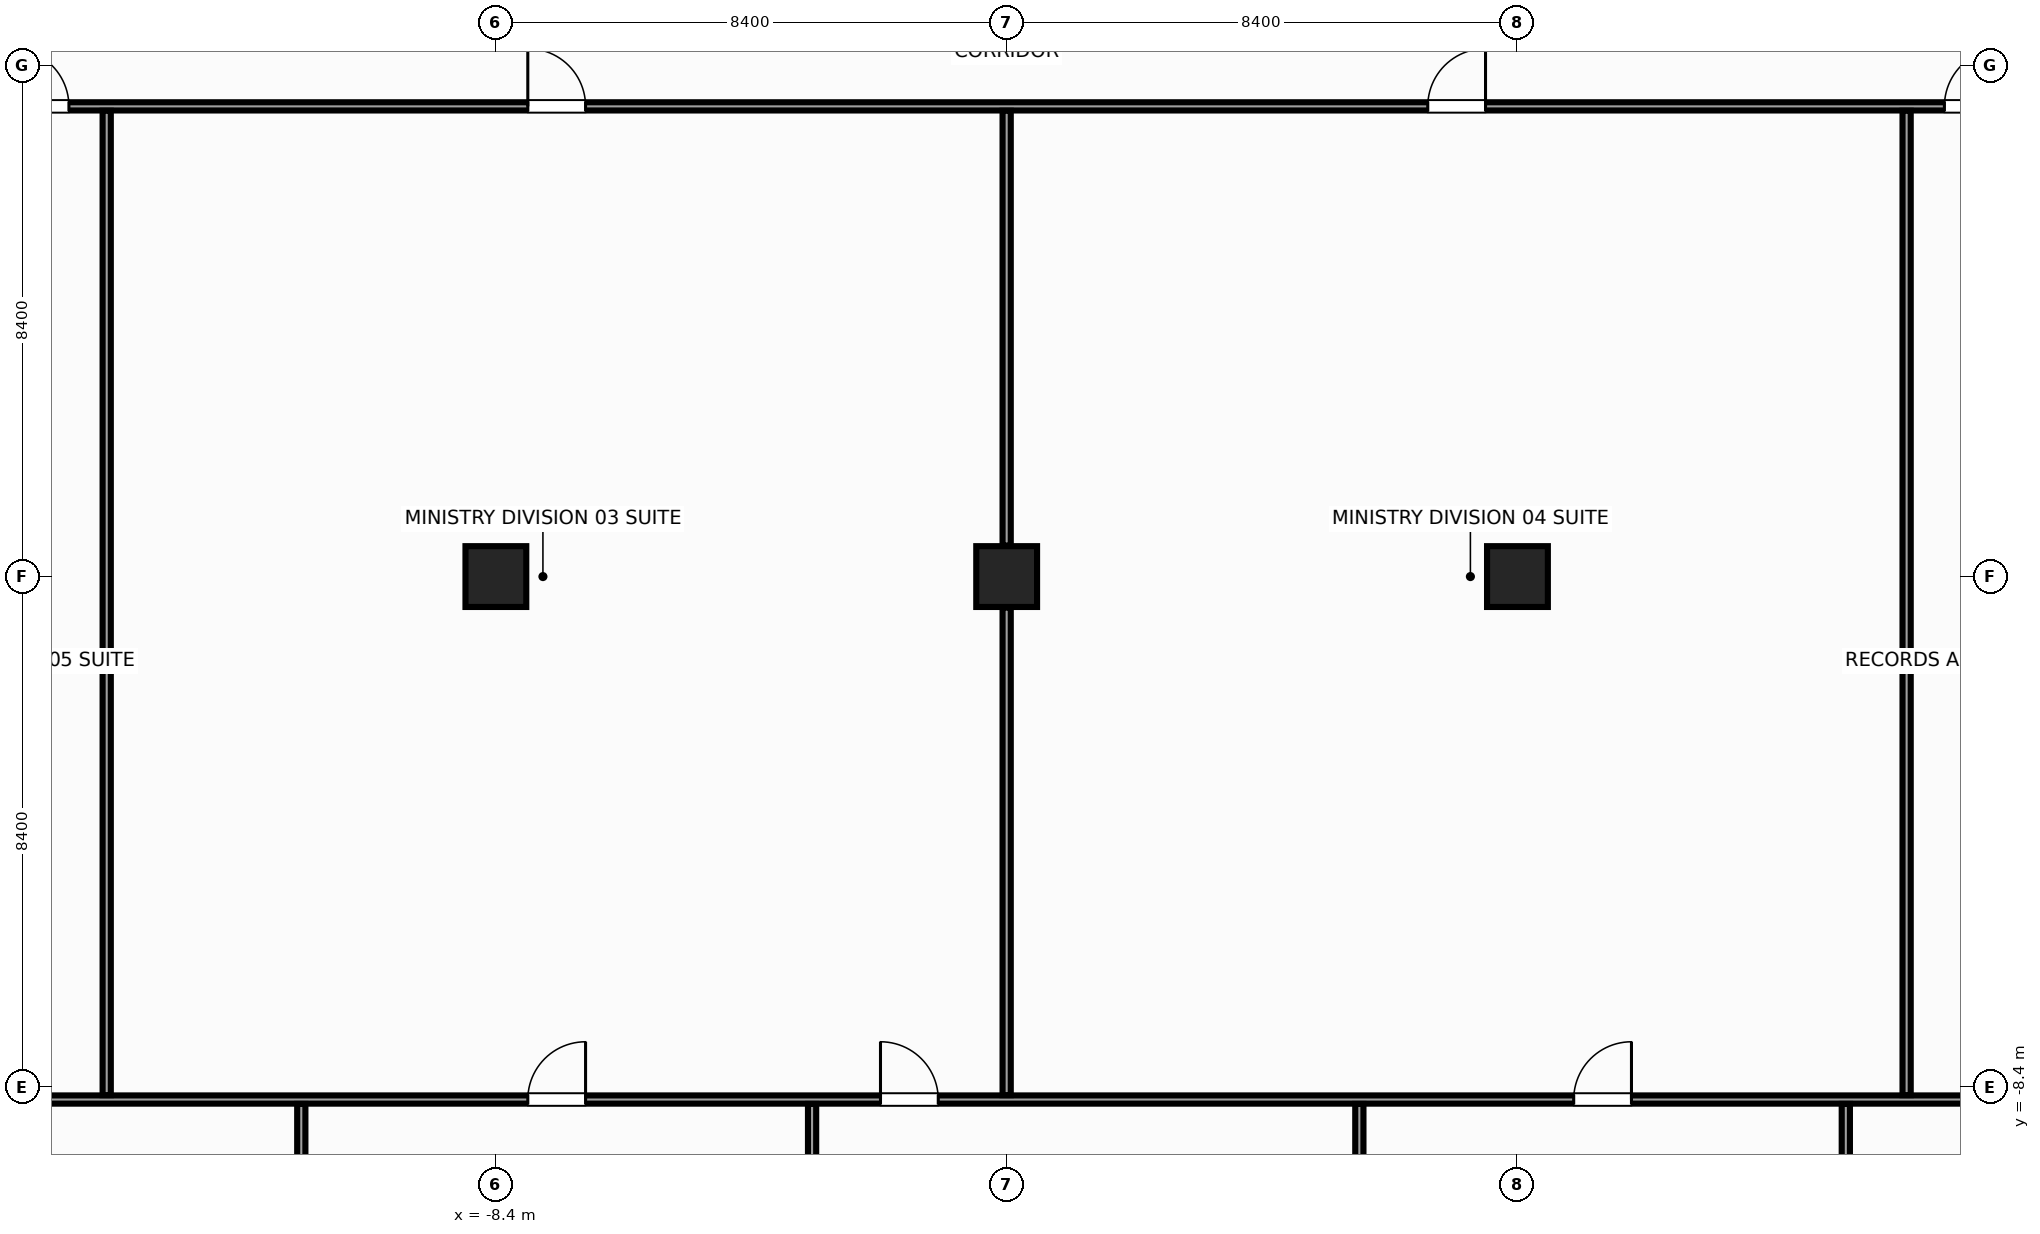
"""IFC4 building model, lengths in metres.
Left out: names, types, materials, properties, quantities, classifications, styles, units other than length and angle.
Written with IfcOpenShell. Run it as: python <this file> out.ifc"""

import sys

from ifc_helpers import new_model, si_unit, direction, frame, frame_2d, origin, origin_with_axes, origin_2d, place, context, subcontext, project, spatial, rectangle, hollow_rectangle, extrude, source, transform, mapped, element, fill, save


model = new_model("IFC4")
c1 = context("Model", 3, precision=1e-05, world=origin(), true_north=direction((0.0, 1.0)))
c2 = subcontext(c1, "Body", "Model", "MODEL_VIEW")
j1 = project(units=[si_unit("LENGTHUNIT", "METRE"), si_unit("PLANEANGLEUNIT", "RADIAN")], contexts=[c1])
p1 = place(None, origin())
s1 = spatial("IfcSite", under=j1, at=p1, CompositionType="ELEMENT")
p2 = place(p1, origin())
s2 = spatial("IfcBuilding", under=s1, at=p2, CompositionType="ELEMENT")
p3 = place(p2, frame((0.0, 0.0, 34.4)))
s3 = spatial("IfcBuildingStorey", under=s2, at=p3, CompositionType="ELEMENT", Elevation=34.4)
m1 = source(origin(), c2, "Body", "SweptSolid", [
    extrude(hollow_rectangle(XDim=1.0, YDim=1.0, WallThickness=0.045, at=origin_2d()), origin(), (0.0, 0.0, 1.0), 3.6),
])
for number, where, z_axis, x_axis in (
    (1, (-8.4, 0.0, 0.0), (0.0, 0.0, 1.0), (1.0, 0.0, 0.0)),
    (2, (8.4, 0.0, 0.0), (0.0, 0.0, 1.0), (1.0, 0.0, 0.0)),
):
    element("IfcColumn", number, at=place(p3, frame(where, z_axis=z_axis, x_axis=x_axis)), inside=s3, PredefinedType="COLUMN", context=c2, shape_type="MappedRepresentation", body=[
        mapped(m1, transform((0.0, 0.0, 0.0), x_axis=(1.0, 0.0, 0.0), y_axis=(0.0, 1.0, 0.0), z_axis=(0.0, 0.0, 1.0), scale=1.0)),
    ])
m2 = source(origin(), c2, "Body", "SweptSolid", [
    extrude(rectangle(XDim=1.0, YDim=1.0, at=origin_2d()), origin(), (0.0, 0.0, 1.0), 3.6),
])
p4 = place(p3, origin_with_axes())
e3 = element("IfcColumn", 3, at=p4, inside=s3, PredefinedType="COLUMN", context=c2, shape_type="MappedRepresentation", body=[
    mapped(m2, transform((0.0, 0.0, 0.0), x_axis=(1.0, 0.0, 0.0), y_axis=(0.0, 1.0, 0.0), z_axis=(0.0, 0.0, 1.0), scale=1.0)),
])
m3 = source(origin(), c2, "Body", "SweptSolid", [
    extrude(rectangle(XDim=36.73, YDim=0.135, at=frame_2d((18.365, 0.0))), origin(), (0.0, 0.0, 1.0), 2.745),
])
p5 = place(p3, frame((-18.365, 7.732, 0.0), z_axis=(0.0, 0.0, 1.0), x_axis=(1.0, 0.0, 0.0)))
e4 = element("IfcWall", 4, at=p5, inside=s3, PredefinedType="PARTITIONING", context=c2, shape_type="MappedRepresentation", body=[
    mapped(m3, transform((0.0, 0.0, 0.0), x_axis=(1.0, 0.0, 0.0), y_axis=(0.0, 1.0, 0.0), z_axis=(0.0, 0.0, 1.0), scale=1.0)),
])
p6 = place(p5, frame((10.49, 0.0, 0.0)))
e5 = element("IfcOpeningElement", 5, at=p6, cuts=e4, PredefinedType="OPENING", context=c2, shape_type="SweptSolid", body=[
    extrude(rectangle(XDim=0.95, YDim=2.15, at=frame_2d((0.475, 1.075))), frame((0.0, 0.08, 0.0), z_axis=(0.0, -1.0, 0.0), x_axis=(1.0, 0.0, 0.0)), (0.0, 0.0, 1.0), 0.159),
])
p7 = place(p5, frame((25.29, 0.0, 0.0)))
e6 = element("IfcOpeningElement", 6, at=p7, cuts=e4, PredefinedType="OPENING", context=c2, shape_type="SweptSolid", body=[
    extrude(rectangle(XDim=0.95, YDim=2.15, at=frame_2d((0.475, 1.075))), frame((0.0, 0.08, 0.0), z_axis=(0.0, -1.0, 0.0), x_axis=(1.0, 0.0, 0.0)), (0.0, 0.0, 1.0), 0.159),
])
p8 = place(p5, frame((1.994, 0.0, 0.0)))
e7 = element("IfcOpeningElement", 7, at=p8, cuts=e4, PredefinedType="OPENING", context=c2, shape_type="SweptSolid", body=[
    extrude(rectangle(XDim=0.95, YDim=2.15, at=frame_2d((0.475, 1.075))), frame((0.0, 0.08, 0.0), z_axis=(0.0, -1.0, 0.0), x_axis=(1.0, 0.0, 0.0)), (0.0, 0.0, 1.0), 0.159),
])
p9 = place(p5, frame((33.786, 0.0, 0.0)))
e8 = element("IfcOpeningElement", 8, at=p9, cuts=e4, PredefinedType="OPENING", context=c2, shape_type="SweptSolid", body=[
    extrude(rectangle(XDim=0.95, YDim=2.15, at=frame_2d((0.475, 1.075))), frame((0.0, 0.08, 0.0), z_axis=(0.0, -1.0, 0.0), x_axis=(1.0, 0.0, 0.0)), (0.0, 0.0, 1.0), 0.159),
])
m4 = source(origin(), c2, "Body", "SweptSolid", [
    extrude(rectangle(XDim=36.72, YDim=0.135, at=frame_2d((18.36, 0.0))), origin(), (0.0, 0.0, 1.0), 2.745),
])
p10 = place(p3, frame((-18.36, -8.6, 0.0), z_axis=(0.0, 0.0, 1.0), x_axis=(1.0, 0.0, 0.0)))
e9 = element("IfcWall", 9, at=p10, inside=s3, PredefinedType="PARTITIONING", context=c2, shape_type="MappedRepresentation", body=[
    mapped(m4, transform((0.0, 0.0, 0.0), x_axis=(1.0, 0.0, 0.0), y_axis=(0.0, 1.0, 0.0), z_axis=(0.0, 0.0, 1.0), scale=1.0)),
])
p11 = place(p10, frame((10.485, 0.0, 0.0)))
e10 = element("IfcOpeningElement", 10, at=p11, cuts=e9, PredefinedType="OPENING", context=c2, shape_type="SweptSolid", body=[
    extrude(rectangle(XDim=0.95, YDim=2.15, at=frame_2d((0.475, 1.075))), frame((0.0, 0.08, 0.0), z_axis=(0.0, -1.0, 0.0), x_axis=(1.0, 0.0, 0.0)), (0.0, 0.0, 1.0), 0.159),
])
p12 = place(p10, frame((16.285, 0.0, 0.0)))
e11 = element("IfcOpeningElement", 11, at=p12, cuts=e9, PredefinedType="OPENING", context=c2, shape_type="SweptSolid", body=[
    extrude(rectangle(XDim=0.95, YDim=2.15, at=frame_2d((0.475, 1.075))), frame((0.0, 0.08, 0.0), z_axis=(0.0, -1.0, 0.0), x_axis=(1.0, 0.0, 0.0)), (0.0, 0.0, 1.0), 0.159),
])
p13 = place(p10, frame((27.685, 0.0, 0.0)))
e12 = element("IfcOpeningElement", 12, at=p13, cuts=e9, PredefinedType="OPENING", context=c2, shape_type="SweptSolid", body=[
    extrude(rectangle(XDim=0.95, YDim=2.15, at=frame_2d((0.475, 1.075))), frame((0.0, 0.08, 0.0), z_axis=(0.0, -1.0, 0.0), x_axis=(1.0, 0.0, 0.0)), (0.0, 0.0, 1.0), 0.159),
])
m5 = source(origin(), c2, "Body", "SweptSolid", [
    extrude(rectangle(XDim=16.188, YDim=0.135, at=frame_2d((8.094, 0.0))), origin(), (0.0, 0.0, 1.0), 2.37),
])
p14 = place(p3, frame((-14.8, -8.528, 0.0), z_axis=(0.0, 0.0, 1.0), x_axis=(0.0, 1.0, 0.0)))
e13 = element("IfcWall", 13, at=p14, inside=s3, PredefinedType="PARTITIONING", context=c2, shape_type="MappedRepresentation", body=[
    mapped(m5, transform((0.0, 0.0, 0.0), x_axis=(1.0, 0.0, 0.0), y_axis=(0.0, 1.0, 0.0), z_axis=(0.0, 0.0, 1.0), scale=1.0)),
])
m6 = source(origin(), c2, "Body", "SweptSolid", [
    extrude(rectangle(XDim=8.018, YDim=0.135, at=frame_2d((4.009, 0.0))), origin(), (0.0, 0.0, 1.0), 2.745),
])
p15 = place(p3, frame((0.0, -8.528, 0.0), z_axis=(0.0, 0.0, 1.0), x_axis=(0.0, 1.0, 0.0)))
e14 = element("IfcWall", 14, at=p15, inside=s3, PredefinedType="PARTITIONING", context=c2, shape_type="MappedRepresentation", body=[
    mapped(m6, transform((0.0, 0.0, 0.0), x_axis=(1.0, 0.0, 0.0), y_axis=(0.0, 1.0, 0.0), z_axis=(0.0, 0.0, 1.0), scale=1.0)),
])
m7 = source(origin(), c2, "Body", "SweptSolid", [
    extrude(rectangle(XDim=7.15, YDim=0.135, at=frame_2d((3.575, 0.0))), origin(), (0.0, 0.0, 1.0), 2.37),
])
p16 = place(p3, frame((0.0, 0.51, 0.0), z_axis=(0.0, 0.0, 1.0), x_axis=(0.0, 1.0, 0.0)))
e15 = element("IfcWall", 15, at=p16, inside=s3, PredefinedType="PARTITIONING", context=c2, shape_type="MappedRepresentation", body=[
    mapped(m7, transform((0.0, 0.0, 0.0), x_axis=(1.0, 0.0, 0.0), y_axis=(0.0, 1.0, 0.0), z_axis=(0.0, 0.0, 1.0), scale=1.0)),
])
p17 = place(p3, frame((14.8, -8.528, 0.0), z_axis=(0.0, 0.0, 1.0), x_axis=(0.0, 1.0, 0.0)))
e16 = element("IfcWall", 16, at=p17, inside=s3, PredefinedType="PARTITIONING", context=c2, shape_type="MappedRepresentation", body=[
    mapped(m5, transform((0.0, 0.0, 0.0), x_axis=(1.0, 0.0, 0.0), y_axis=(0.0, 1.0, 0.0), z_axis=(0.0, 0.0, 1.0), scale=1.0)),
])
m8 = source(origin(), c2, "Body", "SweptSolid", [
    extrude(rectangle(XDim=18.177, YDim=0.135, at=frame_2d((9.089, 0.0))), origin(), (0.0, 0.0, 1.0), 2.745),
])
for number, where, z_axis, x_axis in (
    (17, (-11.6, -26.85, 0.0), (0.0, 0.0, 1.0), (0.0, 1.0, 0.0)),
    (18, (-3.2, -26.85, 0.0), (0.0, 0.0, 1.0), (0.0, 1.0, 0.0)),
    (19, (5.8, -26.85, 0.0), (0.0, 0.0, 1.0), (0.0, 1.0, 0.0)),
    (20, (13.8, -26.85, 0.0), (0.0, 0.0, 1.0), (0.0, 1.0, 0.0)),
):
    element("IfcWall", number, at=place(p3, frame(where, z_axis=z_axis, x_axis=x_axis)), inside=s3, PredefinedType="PARTITIONING", context=c2, shape_type="MappedRepresentation", body=[
        mapped(m8, transform((0.0, 0.0, 0.0), x_axis=(1.0, 0.0, 0.0), y_axis=(0.0, 1.0, 0.0), z_axis=(0.0, 0.0, 1.0), scale=1.0)),
    ])
m9 = source(origin(), c2, "Body", "SweptSolid", [
    extrude(rectangle(XDim=0.95, YDim=2.15, at=frame_2d((0.475, 1.075))), frame((0.0, 0.025, 0.0), z_axis=(0.0, -1.0, 0.0), x_axis=(1.0, 0.0, 0.0)), (0.0, 0.0, 1.0), 0.05),
])
p18 = place(p6, origin())
e21 = element("IfcDoor", 21, at=p18, inside=s3, OperationType="SINGLE_SWING_LEFT", PredefinedType="DOOR", context=c2, shape_type="MappedRepresentation", body=[
    mapped(m9, transform((0.0, 0.0, 0.0), x_axis=(1.0, 0.0, 0.0), y_axis=(0.0, 1.0, 0.0), z_axis=(0.0, 0.0, 1.0), scale=1.0)),
])
fill(e5, e21)
p19 = place(p7, origin())
e22 = element("IfcDoor", 22, at=p19, inside=s3, OperationType="SINGLE_SWING_RIGHT", PredefinedType="DOOR", context=c2, shape_type="MappedRepresentation", body=[
    mapped(m9, transform((0.0, 0.0, 0.0), x_axis=(1.0, 0.0, 0.0), y_axis=(0.0, 1.0, 0.0), z_axis=(0.0, 0.0, 1.0), scale=1.0)),
])
fill(e6, e22)
p20 = place(p8, origin())
e23 = element("IfcDoor", 23, at=p20, inside=s3, OperationType="SINGLE_SWING_LEFT", PredefinedType="DOOR", context=c2, shape_type="MappedRepresentation", body=[
    mapped(m9, transform((0.0, 0.0, 0.0), x_axis=(1.0, 0.0, 0.0), y_axis=(0.0, 1.0, 0.0), z_axis=(0.0, 0.0, 1.0), scale=1.0)),
])
fill(e7, e23)
p21 = place(p9, origin())
e24 = element("IfcDoor", 24, at=p21, inside=s3, OperationType="SINGLE_SWING_RIGHT", PredefinedType="DOOR", context=c2, shape_type="MappedRepresentation", body=[
    mapped(m9, transform((0.0, 0.0, 0.0), x_axis=(1.0, 0.0, 0.0), y_axis=(0.0, 1.0, 0.0), z_axis=(0.0, 0.0, 1.0), scale=1.0)),
])
fill(e8, e24)
p22 = place(p11, origin())
e25 = element("IfcDoor", 25, at=p22, inside=s3, OperationType="SINGLE_SWING_RIGHT", PredefinedType="DOOR", context=c2, shape_type="MappedRepresentation", body=[
    mapped(m9, transform((0.0, 0.0, 0.0), x_axis=(1.0, 0.0, 0.0), y_axis=(0.0, 1.0, 0.0), z_axis=(0.0, 0.0, 1.0), scale=1.0)),
])
fill(e10, e25)
p23 = place(p12, origin())
e26 = element("IfcDoor", 26, at=p23, inside=s3, OperationType="SINGLE_SWING_LEFT", PredefinedType="DOOR", context=c2, shape_type="MappedRepresentation", body=[
    mapped(m9, transform((0.0, 0.0, 0.0), x_axis=(1.0, 0.0, 0.0), y_axis=(0.0, 1.0, 0.0), z_axis=(0.0, 0.0, 1.0), scale=1.0)),
])
fill(e11, e26)
p24 = place(p13, origin())
e27 = element("IfcDoor", 27, at=p24, inside=s3, OperationType="SINGLE_SWING_RIGHT", PredefinedType="DOOR", context=c2, shape_type="MappedRepresentation", body=[
    mapped(m9, transform((0.0, 0.0, 0.0), x_axis=(1.0, 0.0, 0.0), y_axis=(0.0, 1.0, 0.0), z_axis=(0.0, 0.0, 1.0), scale=1.0)),
])
fill(e12, e27)
save(model, sys.argv[1])
